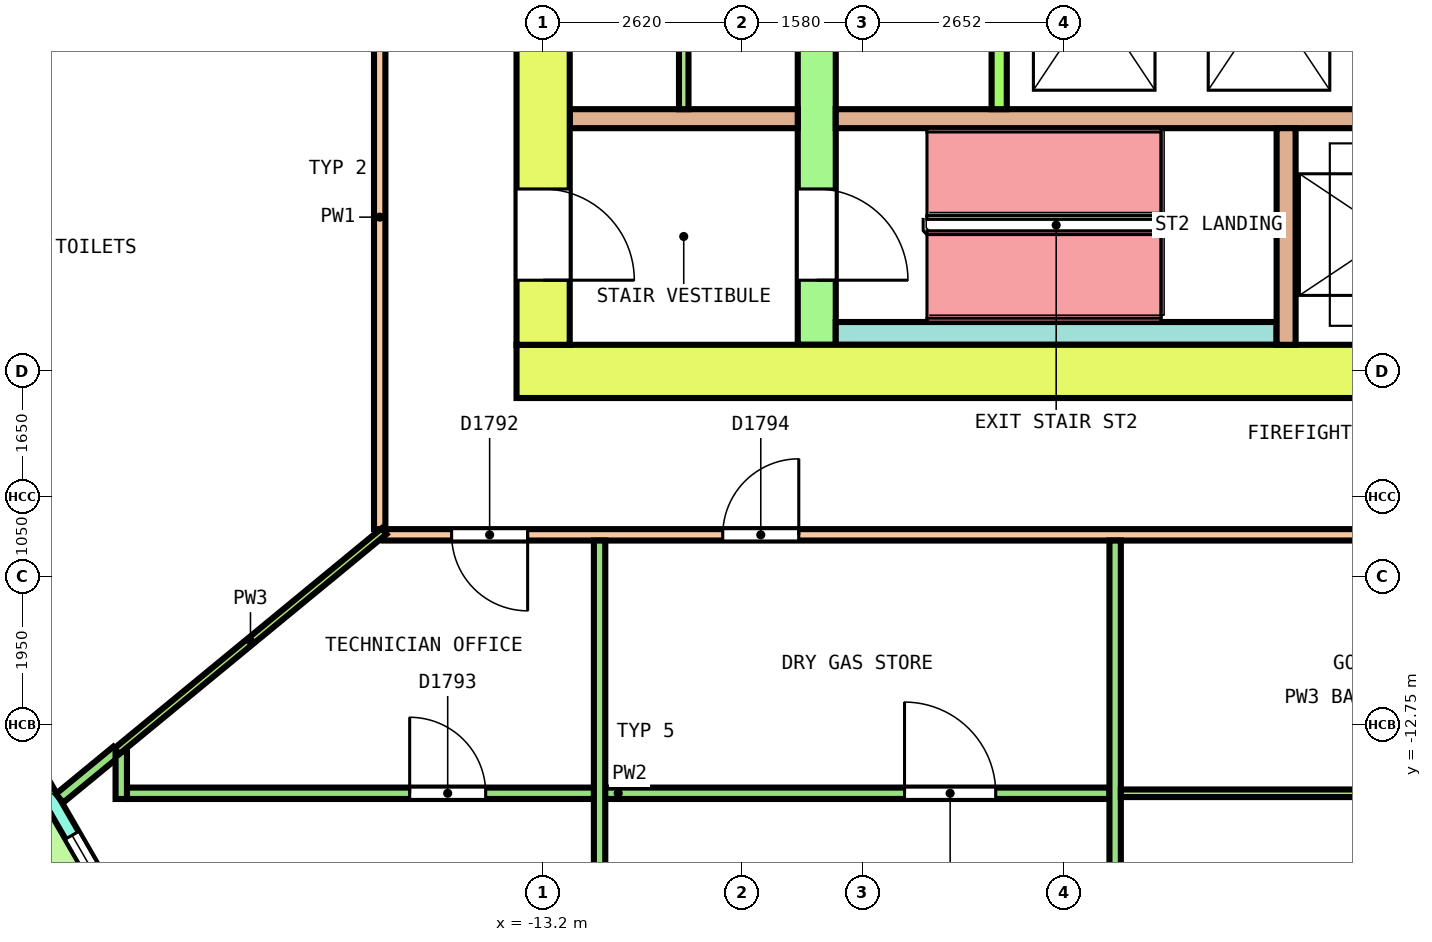
"""IFC4 building model, lengths in metres.
Left out: names, types, materials, properties, quantities, classifications, styles, units other than length and angle.
Written with IfcOpenShell. Run it as: python <this file> out.ifc"""

import sys

from ifc_helpers import new_model, si_unit, direction, frame, frame_2d, origin, place, context, subcontext, project, spatial, polyline, rectangle, outline, extrude, element, fill, save


model = new_model("IFC4")
c1 = context("Model", 3, precision=1e-05, world=origin(), true_north=direction((0.0, 1.0)))
c2 = subcontext(c1, "Body", "Model", "MODEL_VIEW")
j1 = project(units=[si_unit("LENGTHUNIT", "METRE"), si_unit("PLANEANGLEUNIT", "RADIAN")], contexts=[c1])
p1 = place(None, origin())
s1 = spatial("IfcSite", under=j1, at=p1, CompositionType="ELEMENT")
p2 = place(p1, origin())
s2 = spatial("IfcBuilding", under=s1, at=p2, CompositionType="ELEMENT")
p3 = place(p2, frame((0.0, 0.0, 167.2)))
s3 = spatial("IfcBuildingStorey", under=s2, at=p3, CompositionType="ELEMENT", Elevation=167.2)
p4 = place(p3, frame((-26.012, -2.746, 0.0), z_axis=(0.0, 0.0, 1.0), x_axis=(0.499998188434, -0.86602644969, 0.0)))
e1 = element("IfcWall", 1, at=p4, inside=s3, PredefinedType="SOLIDWALL", context=c2, shape_type="SweptSolid", body=[
    extrude(outline(polyline([(-0.027, -0.1), (0.988, -0.1), (2.003, -0.1), (3.017, -0.1), (4.032, -0.1), (5.047, -0.1), (6.062, -0.1), (7.076, -0.1), (8.091, -0.1), (9.106, -0.1), (10.121, -0.1), (11.135, -0.1), (12.15, -0.1), (13.165, -0.1), (14.179, -0.1), (15.194, -0.1), (16.209, -0.1), (17.224, -0.1), (18.239, -0.1), (19.253, -0.1), (20.268, -0.1), (21.283, -0.1), (21.229, 0.1), (20.219, 0.1), (19.21, 0.1), (18.2, 0.1), (17.19, 0.1), (16.181, 0.1), (15.171, 0.1), (14.162, 0.1), (13.152, 0.1), (12.142, 0.1), (11.133, 0.1), (10.123, 0.1), (9.114, 0.1), (8.104, 0.1), (7.094, 0.1), (6.085, 0.1), (5.075, 0.1), (4.065, 0.1), (3.056, 0.1), (2.046, 0.1), (1.036, 0.1), (0.027, 0.1), (-0.027, -0.1)])), origin(), (0.0, 0.0, 1.0), 4.1),
])
p5 = place(p4, frame((0.476, 0.0, 0.1)))
e2 = element("IfcOpeningElement", 2, at=p5, cuts=e1, PredefinedType="OPENING", context=c2, shape_type="SweptSolid", body=[
    extrude(rectangle(XDim=3.3, YDim=2.9, at=frame_2d((1.65, 1.45))), frame((0.0, 0.11, 0.0), z_axis=(0.0, -1.0, 0.0), x_axis=(1.0, 0.0, 0.0)), (0.0, 0.0, 1.0), 0.22),
])
p6 = place(p4, frame((4.727, 0.0, 0.1)))
e3 = element("IfcOpeningElement", 3, at=p6, cuts=e1, PredefinedType="OPENING", context=c2, shape_type="SweptSolid", body=[
    extrude(rectangle(XDim=3.3, YDim=2.9, at=frame_2d((1.65, 1.45))), frame((0.0, 0.11, 0.0), z_axis=(0.0, -1.0, 0.0), x_axis=(1.0, 0.0, 0.0)), (0.0, 0.0, 1.0), 0.22),
])
p7 = place(p4, frame((9.728, 0.0, 0.0)))
e4 = element("IfcOpeningElement", 4, at=p7, cuts=e1, PredefinedType="OPENING", context=c2, shape_type="SweptSolid", body=[
    extrude(rectangle(XDim=1.8, YDim=2.4, at=frame_2d((0.9, 1.2))), frame((0.0, 0.11, 0.0), z_axis=(0.0, -1.0, 0.0), x_axis=(1.0, 0.0, 0.0)), (0.0, 0.0, 1.0), 0.22),
])
p8 = place(p4, frame((9.728, 0.0, 2.55)))
e5 = element("IfcOpeningElement", 5, at=p8, cuts=e1, PredefinedType="OPENING", context=c2, shape_type="SweptSolid", body=[
    extrude(rectangle(XDim=1.8, YDim=0.45, at=frame_2d((0.9, 0.225))), frame((0.0, 0.11, 0.0), z_axis=(0.0, -1.0, 0.0), x_axis=(1.0, 0.0, 0.0)), (0.0, 0.0, 1.0), 0.22),
])
p9 = place(p4, frame((13.229, 0.0, 0.1)))
e6 = element("IfcOpeningElement", 6, at=p9, cuts=e1, PredefinedType="OPENING", context=c2, shape_type="SweptSolid", body=[
    extrude(rectangle(XDim=3.3, YDim=2.9, at=frame_2d((1.65, 1.45))), frame((0.0, 0.11, 0.0), z_axis=(0.0, -1.0, 0.0), x_axis=(1.0, 0.0, 0.0)), (0.0, 0.0, 1.0), 0.22),
])
p10 = place(p4, frame((17.48, 0.0, 0.1)))
e7 = element("IfcOpeningElement", 7, at=p10, cuts=e1, PredefinedType="OPENING", context=c2, shape_type="SweptSolid", body=[
    extrude(rectangle(XDim=3.3, YDim=2.9, at=frame_2d((1.65, 1.45))), frame((0.0, 0.11, 0.0), z_axis=(0.0, -1.0, 0.0), x_axis=(1.0, 0.0, 0.0)), (0.0, 0.0, 1.0), 0.22),
])
p11 = place(p3, frame((-13.55, -8.1, 0.0), z_axis=(0.0, 0.0, 1.0), x_axis=(1.0, 0.0, 0.0)))
e8 = element("IfcWall", 8, at=p11, inside=s3, PredefinedType="SHEAR", context=c2, shape_type="SweptSolid", body=[
    extrude(rectangle(XDim=27.1, YDim=0.7, at=frame_2d((13.55, 0.0))), origin(), (0.0, 0.0, 1.0), 4.1),
])
p12 = place(p11, frame((15.1, 0.0, 0.0)))
e9 = element("IfcOpeningElement", 9, at=p12, cuts=e8, PredefinedType="OPENING", context=c2, shape_type="SweptSolid", body=[
    extrude(rectangle(XDim=1.2, YDim=2.1, at=frame_2d((0.6, 1.05))), frame((0.0, 0.36, 0.0), z_axis=(0.0, -1.0, 0.0), x_axis=(1.0, 0.0, 0.0)), (0.0, 0.0, 1.0), 0.72),
])
p13 = place(p3, frame((-13.2, -7.75, 0.0), z_axis=(0.0, 0.0, 1.0), x_axis=(0.0, 1.0, 0.0)))
e10 = element("IfcWall", 10, at=p13, inside=s3, PredefinedType="SHEAR", context=c2, shape_type="SweptSolid", body=[
    extrude(rectangle(XDim=15.5, YDim=0.7, at=frame_2d((7.75, 0.0))), origin(), (0.0, 0.0, 1.0), 4.1),
])
p14 = place(p13, frame((6.55, 0.0, 0.0)))
e11 = element("IfcOpeningElement", 11, at=p14, cuts=e10, PredefinedType="OPENING", context=c2, shape_type="SweptSolid", body=[
    extrude(rectangle(XDim=2.4, YDim=2.1, at=frame_2d((1.2, 1.05))), frame((0.0, 0.36, 0.0), z_axis=(0.0, -1.0, 0.0), x_axis=(1.0, 0.0, 0.0)), (0.0, 0.0, 1.0), 0.72),
])
p15 = place(p13, frame((13.45, 0.0, 0.0)))
e12 = element("IfcOpeningElement", 12, at=p15, cuts=e10, PredefinedType="OPENING", context=c2, shape_type="SweptSolid", body=[
    extrude(rectangle(XDim=1.2, YDim=2.1, at=frame_2d((0.6, 1.05))), frame((0.0, 0.36, 0.0), z_axis=(0.0, -1.0, 0.0), x_axis=(1.0, 0.0, 0.0)), (0.0, 0.0, 1.0), 0.72),
])
p16 = place(p13, frame((0.85, 0.0, 0.0)))
e13 = element("IfcOpeningElement", 13, at=p16, cuts=e10, PredefinedType="OPENING", context=c2, shape_type="SweptSolid", body=[
    extrude(rectangle(XDim=1.2, YDim=2.1, at=frame_2d((0.6, 1.05))), frame((0.0, 0.36, 0.0), z_axis=(0.0, -1.0, 0.0), x_axis=(1.0, 0.0, 0.0)), (0.0, 0.0, 1.0), 0.72),
])
p17 = place(p3, frame((-9.6, -7.75, 0.0), z_axis=(0.0, 0.0, 1.0), x_axis=(0.0, 1.0, 0.0)))
e14 = element("IfcWall", 14, at=p17, inside=s3, PredefinedType="SHEAR", context=c2, shape_type="SweptSolid", body=[
    extrude(rectangle(XDim=15.5, YDim=0.5, at=frame_2d((7.75, 0.0))), origin(), (0.0, 0.0, 1.0), 4.1),
])
p18 = place(p17, frame((6.55, 0.0, 0.0)))
e15 = element("IfcOpeningElement", 15, at=p18, cuts=e14, PredefinedType="OPENING", context=c2, shape_type="SweptSolid", body=[
    extrude(rectangle(XDim=2.4, YDim=2.1, at=frame_2d((1.2, 1.05))), frame((0.0, 0.26, 0.0), z_axis=(0.0, -1.0, 0.0), x_axis=(1.0, 0.0, 0.0)), (0.0, 0.0, 1.0), 0.52),
])
p19 = place(p17, frame((13.45, 0.0, 0.0)))
e16 = element("IfcOpeningElement", 16, at=p19, cuts=e14, PredefinedType="OPENING", context=c2, shape_type="SweptSolid", body=[
    extrude(rectangle(XDim=1.2, YDim=2.1, at=frame_2d((0.6, 1.05))), frame((0.0, 0.26, 0.0), z_axis=(0.0, -1.0, 0.0), x_axis=(1.0, 0.0, 0.0)), (0.0, 0.0, 1.0), 0.52),
])
p20 = place(p17, frame((0.85, 0.0, 0.0)))
e17 = element("IfcOpeningElement", 17, at=p20, cuts=e14, PredefinedType="OPENING", context=c2, shape_type="SweptSolid", body=[
    extrude(rectangle(XDim=1.2, YDim=2.1, at=frame_2d((0.6, 1.05))), frame((0.0, 0.26, 0.0), z_axis=(0.0, -1.0, 0.0), x_axis=(1.0, 0.0, 0.0)), (0.0, 0.0, 1.0), 0.52),
])
p21 = place(p3, frame((-12.85, -4.775, 0.0), z_axis=(0.0, 0.0, 1.0), x_axis=(1.0, 0.0, 0.0)))
e18 = element("IfcWall", 18, at=p21, inside=s3, PredefinedType="SOLIDWALL", context=c2, shape_type="SweptSolid", body=[
    extrude(rectangle(XDim=3.0, YDim=0.25, at=frame_2d((1.5, 0.0))), origin(), (0.0, 0.0, 1.0), 4.1),
])
p22 = place(p3, frame((-9.35, -4.775, 0.0), z_axis=(0.0, 0.0, 1.0), x_axis=(1.0, 0.0, 0.0)))
e19 = element("IfcWall", 19, at=p22, inside=s3, PredefinedType="SOLIDWALL", context=c2, shape_type="SweptSolid", body=[
    extrude(rectangle(XDim=18.7, YDim=0.25, at=frame_2d((9.35, 0.0))), origin(), (0.0, 0.0, 1.0), 4.1),
])
p23 = place(p3, frame((-7.2, -4.65, 0.0), z_axis=(0.0, 0.0, 1.0), x_axis=(0.0, 1.0, 0.0)))
e20 = element("IfcWall", 20, at=p23, inside=s3, PredefinedType="SOLIDWALL", context=c2, shape_type="SweptSolid", body=[
    extrude(rectangle(XDim=2.9, YDim=0.2, at=frame_2d((1.45, 0.0))), origin(), (0.0, 0.0, 1.0), 4.1),
])
p24 = place(p3, frame((-9.35, -7.6, 0.0), z_axis=(0.0, 0.0, 1.0), x_axis=(1.0, 0.0, 0.0)))
e21 = element("IfcWall", 21, at=p24, inside=s3, PredefinedType="SOLIDWALL", context=c2, shape_type="SweptSolid", body=[
    extrude(rectangle(XDim=5.8, YDim=0.3, at=frame_2d((2.9, 0.0))), origin(), (0.0, 0.0, 1.0), 4.1),
])
p25 = place(p3, frame((-3.425, -7.75, 0.0), z_axis=(0.0, 0.0, 1.0), x_axis=(0.0, 1.0, 0.0)))
e22 = element("IfcWall", 22, at=p25, inside=s3, PredefinedType="SOLIDWALL", context=c2, shape_type="SweptSolid", body=[
    extrude(rectangle(XDim=2.85, YDim=0.25, at=frame_2d((1.425, 0.0))), origin(), (0.0, 0.0, 1.0), 4.1),
])
p26 = place(p3, frame((-11.35, -4.65, 0.0), z_axis=(0.0, 0.0, 1.0), x_axis=(0.0, 1.0, 0.0)))
e23 = element("IfcWall", 23, at=p26, inside=s3, PredefinedType="PARTITIONING", context=c2, shape_type="SweptSolid", body=[
    extrude(rectangle(XDim=2.9, YDim=0.125, at=frame_2d((1.45, 0.0))), origin(), (0.0, 0.0, 1.0), 4.1),
])
p27 = place(p3, frame((-15.35, -10.175, 0.0), z_axis=(0.0, 0.0, 1.0), x_axis=(0.0, 1.0, 0.0)))
e24 = element("IfcWall", 24, at=p27, inside=s3, PredefinedType="PARTITIONING", context=c2, shape_type="SweptSolid", body=[
    extrude(rectangle(XDim=8.209, YDim=0.15, at=frame_2d((4.104, 0.0))), origin(), (0.0, 0.0, 1.0), 3.05),
])
p28 = place(p3, frame((-15.3, -10.25, 0.0), z_axis=(0.0, 0.0, 1.0), x_axis=(1.0, 0.0, 0.0)))
e25 = element("IfcWall", 25, at=p28, inside=s3, PredefinedType="PARTITIONING", context=c2, shape_type="SweptSolid", body=[
    extrude(rectangle(XDim=30.6, YDim=0.15, at=frame_2d((15.3, 0.0))), origin(), (0.0, 0.0, 1.0), 3.05),
])
p29 = place(p28, frame((0.896, 0.0, 0.0)))
e26 = element("IfcOpeningElement", 26, at=p29, cuts=e25, PredefinedType="OPENING", context=c2, shape_type="SweptSolid", body=[
    extrude(rectangle(XDim=1.0, YDim=2.1, at=frame_2d((0.5, 1.05))), frame((0.0, 0.085, 0.0), z_axis=(0.0, -1.0, 0.0), x_axis=(1.0, 0.0, 0.0)), (0.0, 0.0, 1.0), 0.17),
])
p30 = place(p28, frame((4.463, 0.0, 0.0)))
e27 = element("IfcOpeningElement", 27, at=p30, cuts=e25, PredefinedType="OPENING", context=c2, shape_type="SweptSolid", body=[
    extrude(rectangle(XDim=1.0, YDim=2.1, at=frame_2d((0.5, 1.05))), frame((0.0, 0.085, 0.0), z_axis=(0.0, -1.0, 0.0), x_axis=(1.0, 0.0, 0.0)), (0.0, 0.0, 1.0), 0.17),
])
p31 = place(p28, frame((13.788, 0.0, 0.0)))
e28 = element("IfcOpeningElement", 28, at=p31, cuts=e25, PredefinedType="OPENING", context=c2, shape_type="SweptSolid", body=[
    extrude(rectangle(XDim=1.0, YDim=2.1, at=frame_2d((0.5, 1.05))), frame((0.0, 0.085, 0.0), z_axis=(0.0, -1.0, 0.0), x_axis=(1.0, 0.0, 0.0)), (0.0, 0.0, 1.0), 0.17),
])
p32 = place(p28, frame((26.21, 0.0, 0.0)))
e29 = element("IfcOpeningElement", 29, at=p32, cuts=e25, PredefinedType="OPENING", context=c2, shape_type="SweptSolid", body=[
    extrude(rectangle(XDim=1.2, YDim=2.1, at=frame_2d((0.6, 1.05))), frame((0.0, 0.085, 0.0), z_axis=(0.0, -1.0, 0.0), x_axis=(1.0, 0.0, 0.0)), (0.0, 0.0, 1.0), 0.17),
])
p33 = place(p3, frame((-19.562, -13.717, 0.0), z_axis=(0.0, 0.0, 1.0), x_axis=(0.772240248353, 0.635330621664, 0.0)))
e30 = element("IfcWall", 30, at=p33, inside=s3, PredefinedType="PARTITIONING", context=c2, shape_type="SweptSolid", body=[
    extrude(rectangle(XDim=0.977, YDim=0.15, at=frame_2d((0.489, 0.0))), origin(), (0.0, 0.0, 1.0), 3.05),
])
p34 = place(p3, frame((-18.675, -13.65, 0.0), z_axis=(0.0, 0.0, 1.0), x_axis=(1.0, 0.0, 0.0)))
e31 = element("IfcWall", 31, at=p34, inside=s3, PredefinedType="PARTITIONING", context=c2, shape_type="SweptSolid", body=[
    extrude(rectangle(XDim=12.926, YDim=0.15, at=frame_2d((6.463, 0.0))), origin(), (0.0, 0.0, 1.0), 3.05),
])
p35 = place(p34, frame((3.719, 0.0, 0.0)))
e32 = element("IfcOpeningElement", 32, at=p35, cuts=e31, PredefinedType="OPENING", context=c2, shape_type="SweptSolid", body=[
    extrude(rectangle(XDim=1.0, YDim=2.1, at=frame_2d((0.5, 1.05))), frame((0.0, 0.085, 0.0), z_axis=(0.0, -1.0, 0.0), x_axis=(1.0, 0.0, 0.0)), (0.0, 0.0, 1.0), 0.17),
])
p36 = place(p34, frame((10.23, 0.0, 0.0)))
e33 = element("IfcOpeningElement", 33, at=p36, cuts=e31, PredefinedType="OPENING", context=c2, shape_type="SweptSolid", body=[
    extrude(rectangle(XDim=1.2, YDim=2.1, at=frame_2d((0.6, 1.05))), frame((0.0, 0.085, 0.0), z_axis=(0.0, -1.0, 0.0), x_axis=(1.0, 0.0, 0.0)), (0.0, 0.0, 1.0), 0.17),
])
p37 = place(p3, frame((-18.75, -13.725, 0.0), z_axis=(0.0, 0.0, 1.0), x_axis=(0.0, 1.0, 0.0)))
e34 = element("IfcWall", 34, at=p37, inside=s3, PredefinedType="PARTITIONING", context=c2, shape_type="SweptSolid", body=[
    extrude(rectangle(XDim=0.627, YDim=0.15, at=frame_2d((0.313, 0.0))), origin(), (0.0, 0.0, 1.0), 3.05),
])
p38 = place(p3, frame((-12.457, -22.729, 0.0), z_axis=(0.0, 0.0, 1.0), x_axis=(0.0, 1.0, 0.0)))
e35 = element("IfcWall", 35, at=p38, inside=s3, PredefinedType="PARTITIONING", context=c2, shape_type="SweptSolid", body=[
    extrude(rectangle(XDim=12.404, YDim=0.15, at=frame_2d((6.202, 0.0))), origin(), (0.0, 0.0, 1.0), 3.05),
])
p39 = place(p3, frame((-5.674, -24.491, 0.0), z_axis=(0.0, 0.0, 1.0), x_axis=(0.0, 1.0, 0.0)))
e36 = element("IfcWall", 36, at=p39, inside=s3, PredefinedType="PARTITIONING", context=c2, shape_type="SweptSolid", body=[
    extrude(rectangle(XDim=14.167, YDim=0.15, at=frame_2d((7.083, 0.0))), origin(), (0.0, 0.0, 1.0), 3.05),
])
p40 = place(p3, frame((-18.808, -13.096, 0.0), z_axis=(0.0, 0.0, 1.0), x_axis=(0.772157704822, 0.635430939508, 0.0)))
e37 = element("IfcWall", 37, at=p40, inside=s3, PredefinedType="PARTITIONING", context=c2, shape_type="SweptSolid", body=[
    extrude(rectangle(XDim=4.553, YDim=0.1, at=frame_2d((2.277, 0.0))), origin(), (0.0, 0.0, 1.0), 3.05),
])
p41 = place(p3, frame((-5.599, -13.65, 0.0), z_axis=(0.0, 0.0, 1.0), x_axis=(1.0, 0.0, 0.0)))
e38 = element("IfcWall", 38, at=p41, inside=s3, PredefinedType="PARTITIONING", context=c2, shape_type="SweptSolid", body=[
    extrude(rectangle(XDim=7.441, YDim=0.1, at=frame_2d((3.72, 0.0))), origin(), (0.0, 0.0, 1.0), 3.05),
])
p42 = place(p41, frame((3.208, 0.0, 0.0)))
e39 = element("IfcOpeningElement", 39, at=p42, cuts=e38, PredefinedType="OPENING", context=c2, shape_type="SweptSolid", body=[
    extrude(rectangle(XDim=1.0, YDim=2.1, at=frame_2d((0.5, 1.05))), frame((0.0, 0.06, 0.0), z_axis=(0.0, -1.0, 0.0), x_axis=(1.0, 0.0, 0.0)), (0.0, 0.0, 1.0), 0.12),
])
p43 = place(p9, origin())
e40 = element("IfcWindow", 40, at=p43, inside=s3, PartitioningType="SINGLE_PANEL", PredefinedType="WINDOW", context=c2, shape_type="SweptSolid", body=[
    extrude(rectangle(XDim=3.3, YDim=2.9, at=frame_2d((1.65, 1.45))), frame((0.0, 0.03, 0.0), z_axis=(0.0, -1.0, 0.0), x_axis=(1.0, 0.0, 0.0)), (0.0, 0.0, 1.0), 0.06),
])
fill(e6, e40)
p44 = place(p20, origin())
e41 = element("IfcDoor", 41, at=p44, inside=s3, OperationType="SINGLE_SWING_LEFT", PredefinedType="DOOR", context=c2, shape_type="SweptSolid", body=[
    extrude(rectangle(XDim=1.2, YDim=2.1, at=frame_2d((0.6, 1.05))), frame((0.0, 0.2, 0.0), z_axis=(0.0, -1.0, 0.0), x_axis=(1.0, 0.0, 0.0)), (0.0, 0.0, 1.0), 0.4),
])
fill(e17, e41)
p45 = place(p16, origin())
e42 = element("IfcDoor", 42, at=p45, inside=s3, OperationType="SINGLE_SWING_RIGHT", PredefinedType="DOOR", context=c2, shape_type="SweptSolid", body=[
    extrude(rectangle(XDim=1.2, YDim=2.1, at=frame_2d((0.6, 1.05))), frame((0.0, 0.3, 0.0), z_axis=(0.0, -1.0, 0.0), x_axis=(1.0, 0.0, 0.0)), (0.0, 0.0, 1.0), 0.6),
])
fill(e13, e42)
p46 = place(p29, origin())
e43 = element("IfcDoor", 43, at=p46, inside=s3, OperationType="SINGLE_SWING_LEFT", PredefinedType="DOOR", context=c2, shape_type="SweptSolid", body=[
    extrude(rectangle(XDim=1.0, YDim=2.1, at=frame_2d((0.5, 1.05))), frame((0.0, 0.025, 0.0), z_axis=(0.0, -1.0, 0.0), x_axis=(1.0, 0.0, 0.0)), (0.0, 0.0, 1.0), 0.05),
])
fill(e26, e43)
p47 = place(p35, origin())
e44 = element("IfcDoor", 44, at=p47, inside=s3, OperationType="SINGLE_SWING_RIGHT", PredefinedType="DOOR", context=c2, shape_type="SweptSolid", body=[
    extrude(rectangle(XDim=1.0, YDim=2.1, at=frame_2d((0.5, 1.05))), frame((0.0, 0.025, 0.0), z_axis=(0.0, -1.0, 0.0), x_axis=(1.0, 0.0, 0.0)), (0.0, 0.0, 1.0), 0.05),
])
fill(e32, e44)
p48 = place(p30, origin())
e45 = element("IfcDoor", 45, at=p48, inside=s3, OperationType="SINGLE_SWING_RIGHT", PredefinedType="DOOR", context=c2, shape_type="SweptSolid", body=[
    extrude(rectangle(XDim=1.0, YDim=2.1, at=frame_2d((0.5, 1.05))), frame((0.0, 0.025, 0.0), z_axis=(0.0, -1.0, 0.0), x_axis=(1.0, 0.0, 0.0)), (0.0, 0.0, 1.0), 0.05),
])
fill(e27, e45)
p49 = place(p36, origin())
e46 = element("IfcDoor", 46, at=p49, inside=s3, OperationType="DOUBLE_DOOR_SINGLE_SWING", PredefinedType="DOOR", context=c2, shape_type="SweptSolid", body=[
    extrude(rectangle(XDim=1.2, YDim=2.1, at=frame_2d((0.6, 1.05))), frame((0.0, 0.025, 0.0), z_axis=(0.0, -1.0, 0.0), x_axis=(1.0, 0.0, 0.0)), (0.0, 0.0, 1.0), 0.05),
])
fill(e33, e46)
save(model, sys.argv[1])
